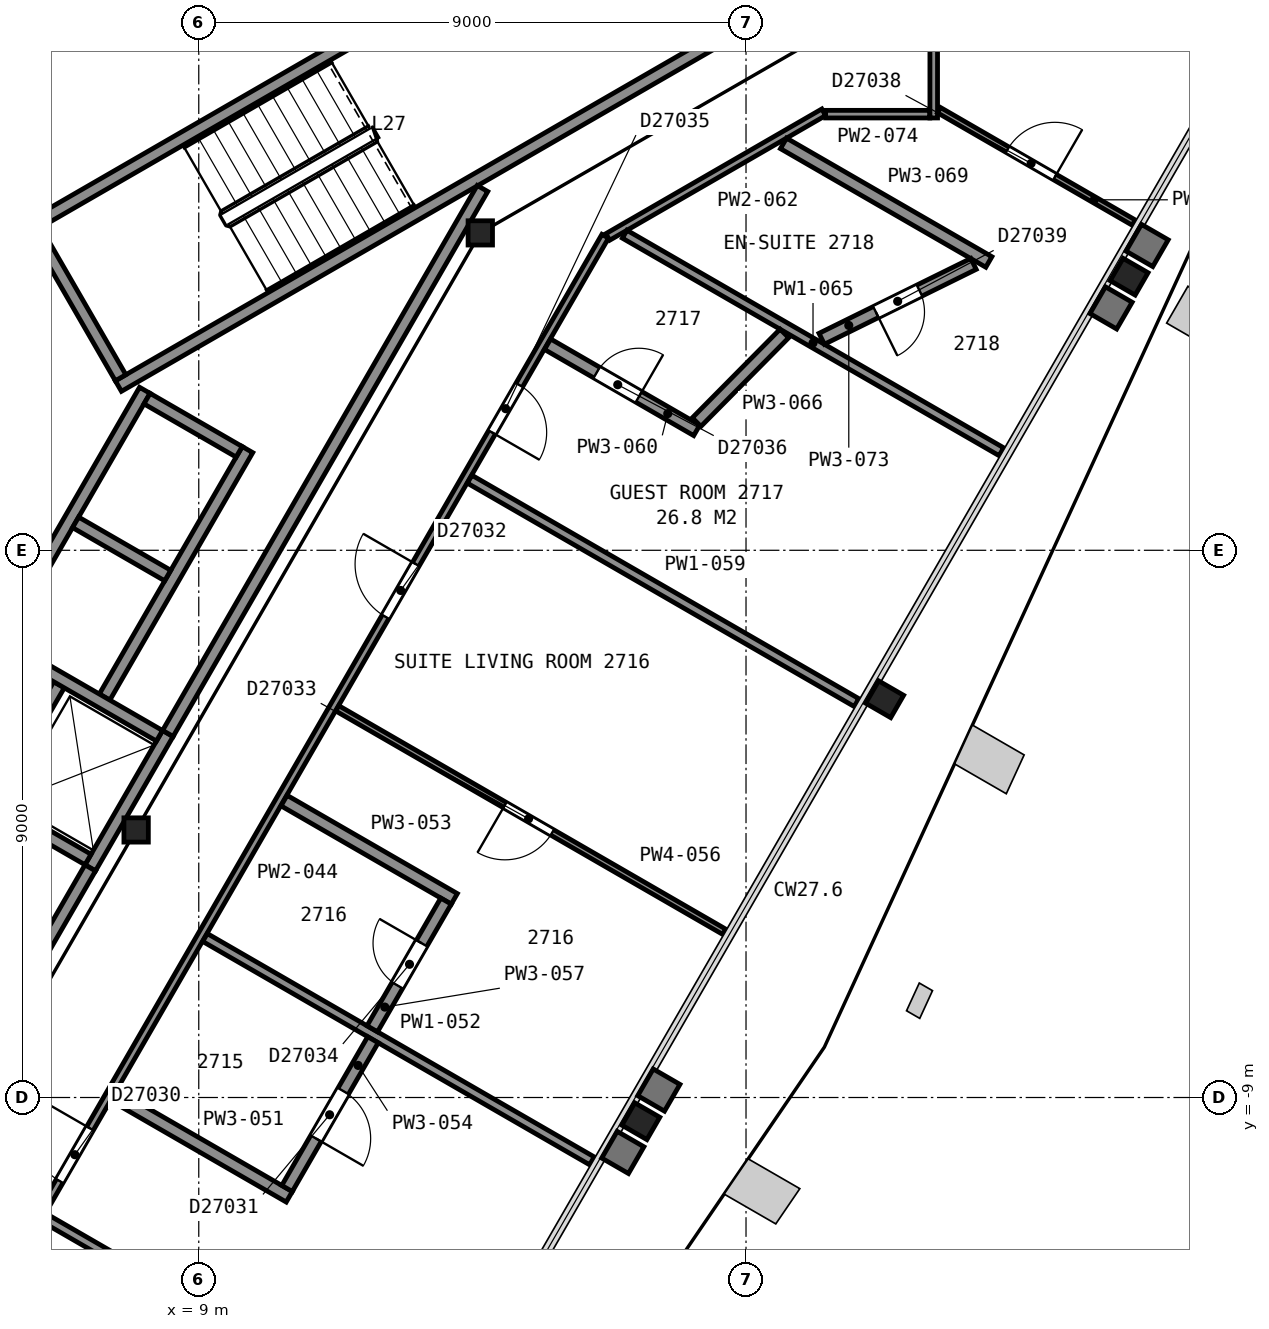
"""IFC4 building model, lengths in metres.
Left out: names, types, materials, properties, quantities, classifications, styles, units other than length and angle.
Written with IfcOpenShell. Run it as: python <this file> out.ifc"""

import sys

from ifc_helpers import new_model, si_unit, direction, frame, frame_2d, origin, origin_2d, place, context, subcontext, project, spatial, rectangle, i_section, extrude, element, fill, save


model = new_model("IFC4")
c1 = context("Model", 3, precision=1e-05, world=origin(), true_north=direction((0.0, 1.0)))
c2 = subcontext(c1, "Body", "Model", "MODEL_VIEW")
j1 = project(units=[si_unit("LENGTHUNIT", "METRE"), si_unit("PLANEANGLEUNIT", "RADIAN")], contexts=[c1])
p1 = place(None, origin())
s1 = spatial("IfcSite", under=j1, at=p1, CompositionType="ELEMENT")
p2 = place(p1, origin())
s2 = spatial("IfcBuilding", under=s1, at=p2, CompositionType="ELEMENT")
p3 = place(p2, frame((0.0, 0.0, 114.4)))
s3 = spatial("IfcBuildingStorey", under=s2, at=p3, CompositionType="ELEMENT", Elevation=114.4)
p4 = place(p3, frame((16.27, -9.39, 0.0), z_axis=(0.0, 0.0, 1.0), x_axis=(-0.5, -0.866025403784, 0.0)))
e1 = element("IfcColumn", 1, at=p4, inside=s3, PredefinedType="COLUMN", context=c2, shape_type="SweptSolid", body=[
    extrude(i_section(OverallWidth=0.424, OverallDepth=0.475, WebThickness=0.048, FlangeThickness=0.077, FilletRadius=0.015, at=origin_2d()), origin(), (0.0, 0.0, 1.0), 3.565),
])
p5 = place(p3, frame((20.28, -2.45, 0.0), z_axis=(0.0, 0.0, 1.0), x_axis=(-0.5, -0.866025403784, 0.0)))
e2 = element("IfcColumn", 2, at=p5, inside=s3, PredefinedType="COLUMN", context=c2, shape_type="SweptSolid", body=[
    extrude(i_section(OverallWidth=0.424, OverallDepth=0.475, WebThickness=0.048, FlangeThickness=0.077, FilletRadius=0.015, at=origin_2d()), origin(), (0.0, 0.0, 1.0), 3.56),
])
p6 = place(p3, frame((24.3, 4.5, 0.0), z_axis=(0.0, 0.0, 1.0), x_axis=(-0.5, -0.866025403784, 0.0)))
e3 = element("IfcColumn", 3, at=p6, inside=s3, PredefinedType="COLUMN", context=c2, shape_type="SweptSolid", body=[
    extrude(i_section(OverallWidth=0.424, OverallDepth=0.475, WebThickness=0.048, FlangeThickness=0.077, FilletRadius=0.015, at=origin_2d()), origin(), (0.0, 0.0, 1.0), 3.555),
])
for number, where, z_axis, x_axis in (
    (4, (13.63, 5.22, 0.0), (0.0, 0.0, 1.0), (1.0, 0.0, 0.0)),
    (5, (7.97, -4.6, 0.0), (0.0, 0.0, 1.0), (1.0, 0.0, 0.0)),
):
    element("IfcColumn", number, at=place(p3, frame(where, z_axis=z_axis, x_axis=x_axis)), inside=s3, PredefinedType="COLUMN", context=c2, shape_type="SweptSolid", body=[
        extrude(i_section(OverallWidth=0.401, OverallDepth=0.399, WebThickness=0.025, FlangeThickness=0.04, FilletRadius=0.015, at=origin_2d()), origin(), (0.0, 0.0, 1.0), 3.6),
    ])
for number, where, z_axis, x_axis in (
    (6, (6.178, 5.299, 0.0), (0.0, 0.0, 1.0), (0.866, 0.5, 0.0)),
    (7, (7.678, 2.701, 0.0), (0.0, 0.0, 1.0), (0.866, 0.5, 0.0)),
):
    element("IfcWall", number, at=place(p3, frame(where, z_axis=z_axis, x_axis=x_axis)), inside=s3, PredefinedType="PARTITIONING", context=c2, shape_type="SweptSolid", body=[
        extrude(rectangle(XDim=12.0, YDim=0.2, at=frame_2d((6.0, 0.0))), origin(), (0.0, 0.0, 1.0), 3.35),
    ])
p7 = place(p3, frame((7.715, 2.838, 0.0), z_axis=(0.0, 0.0, 1.0), x_axis=(-0.500049511043, 0.865996816683, 0.0)))
e8 = element("IfcWall", 8, at=p7, inside=s3, PredefinedType="PARTITIONING", context=c2, shape_type="SweptSolid", body=[
    extrude(rectangle(XDim=2.8, YDim=0.2, at=frame_2d((1.4, 0.0))), origin(), (0.0, 0.0, 1.0), 3.35),
])
p8 = place(p3, frame((7.216, -5.222, 0.0), z_axis=(0.0, 0.0, 1.0), x_axis=(0.499990435942, 0.866030925526, 0.0)))
e9 = element("IfcWall", 9, at=p8, inside=s3, PredefinedType="PARTITIONING", context=c2, shape_type="SweptSolid", body=[
    extrude(rectangle(XDim=2.55, YDim=0.2, at=frame_2d((1.275, 0.0))), origin(), (0.0, 0.0, 1.0), 3.6),
])
p9 = place(p3, frame((7.451, -2.414, 0.0), z_axis=(0.0, 0.0, 1.0), x_axis=(0.500016218704, 0.866016039709, 0.0)))
e10 = element("IfcWall", 10, at=p9, inside=s3, PredefinedType="PARTITIONING", context=c2, shape_type="SweptSolid", body=[
    extrude(rectangle(XDim=4.7, YDim=0.2, at=frame_2d((2.35, 0.0))), origin(), (0.0, 0.0, 1.0), 3.6),
])
p10 = place(p3, frame((5.527, -4.247, 0.0), z_axis=(0.0, 0.0, 1.0), x_axis=(0.499938297808, 0.866061024631, 0.0)))
e11 = element("IfcWall", 11, at=p10, inside=s3, PredefinedType="PARTITIONING", context=c2, shape_type="SweptSolid", body=[
    extrude(rectangle(XDim=2.35, YDim=0.2, at=frame_2d((1.175, 0.0))), origin(), (0.0, 0.0, 1.0), 3.6),
])
p11 = place(p10, frame((0.725, 0.0, 0.0)))
e12 = element("IfcOpeningElement", 12, at=p11, cuts=e11, PredefinedType="OPENING", context=c2, shape_type="SweptSolid", body=[
    extrude(rectangle(XDim=1.1, YDim=2.1, at=frame_2d((0.55, 1.05))), frame((0.0, 0.11, 0.0), z_axis=(0.0, -1.0, 0.0), x_axis=(1.0, 0.0, 0.0)), (0.0, 0.0, 1.0), 0.22),
])
p12 = place(p3, frame((5.663, -1.612, 0.0), z_axis=(0.0, 0.0, 1.0), x_axis=(0.49998122708, 0.866036242063, 0.0)))
e13 = element("IfcWall", 13, at=p12, inside=s3, PredefinedType="PARTITIONING", context=c2, shape_type="SweptSolid", body=[
    extrude(rectangle(XDim=4.9, YDim=0.2, at=frame_2d((2.45, 0.0))), origin(), (0.0, 0.0, 1.0), 3.6),
])
p13 = place(p3, frame((9.665, 1.62, 0.0), z_axis=(0.0, 0.0, 1.0), x_axis=(-0.866002029911, 0.500040482552, 0.0)))
e14 = element("IfcWall", 14, at=p13, inside=s3, PredefinedType="PARTITIONING", context=c2, shape_type="SweptSolid", body=[
    extrude(rectangle(XDim=1.75, YDim=0.2, at=frame_2d((0.875, 0.0))), origin(), (0.0, 0.0, 1.0), 3.6),
])
p14 = place(p3, frame((8.49, -0.416, 0.0), z_axis=(0.0, 0.0, 1.0), x_axis=(-0.866036909293, 0.499980071345, 0.0)))
e15 = element("IfcWall", 15, at=p14, inside=s3, PredefinedType="PARTITIONING", context=c2, shape_type="SweptSolid", body=[
    extrude(rectangle(XDim=1.75, YDim=0.2, at=frame_2d((0.875, 0.0))), origin(), (0.0, 0.0, 1.0), 3.6),
])
p15 = place(p3, frame((8.354, -3.051, 0.0), z_axis=(0.0, 0.0, 1.0), x_axis=(-0.866060182126, 0.499939757307, 0.0)))
e16 = element("IfcWall", 16, at=p15, inside=s3, PredefinedType="PARTITIONING", context=c2, shape_type="SweptSolid", body=[
    extrude(rectangle(XDim=2.95, YDim=0.2, at=frame_2d((1.475, 0.0))), origin(), (0.0, 0.0, 1.0), 3.6),
])
p16 = place(p3, frame((7.179, -5.086, 0.0), z_axis=(0.0, 0.0, 1.0), x_axis=(-0.866036909293, 0.499980071345, 0.0)))
e17 = element("IfcWall", 17, at=p16, inside=s3, PredefinedType="PARTITIONING", context=c2, shape_type="SweptSolid", body=[
    extrude(rectangle(XDim=1.75, YDim=0.2, at=frame_2d((0.875, 0.0))), origin(), (0.0, 0.0, 1.0), 3.6),
])
p17 = place(p3, frame((5.906, -7.49, 0.0), z_axis=(0.0, 0.0, 1.0), x_axis=(0.500252727967, 0.865879442048, 0.0)))
e18 = element("IfcWall", 18, at=p17, inside=s3, PredefinedType="PARTITIONING", context=c2, shape_type="SweptSolid", body=[
    extrude(rectangle(XDim=2.617, YDim=0.2, at=frame_2d((1.309, 0.0))), origin(), (0.0, 0.0, 1.0), 3.35),
])
p18 = place(p3, frame((8.492, -3.012, 0.0), z_axis=(0.0, 0.0, 1.0), x_axis=(0.499972957231, 0.866041016371, 0.0)))
e19 = element("IfcWall", 19, at=p18, inside=s3, PredefinedType="PARTITIONING", context=c2, shape_type="SweptSolid", body=[
    extrude(rectangle(XDim=10.349, YDim=0.2, at=frame_2d((5.174, 0.0))), origin(), (0.0, 0.0, 1.0), 3.35),
])
p19 = place(p3, frame((15.684, 5.165, 0.0), z_axis=(0.0, 0.0, 1.0), x_axis=(-0.500027787016, -0.866009360349, 0.0)))
e20 = element("IfcWall", 20, at=p19, inside=s3, PredefinedType="PARTITIONING", context=c2, shape_type="SweptSolid", body=[
    extrude(rectangle(XDim=23.856, YDim=0.125, at=frame_2d((11.928, 0.0))), origin(), (0.0, 0.0, 1.0), 2.613),
])
p20 = place(p19, frame((20.245, 0.0, 0.0)))
e21 = element("IfcOpeningElement", 21, at=p20, cuts=e20, PredefinedType="OPENING", context=c2, shape_type="SweptSolid", body=[
    extrude(rectangle(XDim=1.0, YDim=2.1, at=frame_2d((0.5, 1.05))), frame((0.0, 0.073, 0.0), z_axis=(0.0, -1.0, 0.0), x_axis=(1.0, 0.0, 0.0)), (0.0, 0.0, 1.0), 0.145),
])
p21 = place(p19, frame((16.943, 0.0, 0.0)))
e22 = element("IfcOpeningElement", 22, at=p21, cuts=e20, PredefinedType="OPENING", context=c2, shape_type="SweptSolid", body=[
    extrude(rectangle(XDim=1.0, YDim=2.1, at=frame_2d((0.5, 1.05))), frame((0.0, 0.073, 0.0), z_axis=(0.0, -1.0, 0.0), x_axis=(1.0, 0.0, 0.0)), (0.0, 0.0, 1.0), 0.145),
])
p22 = place(p19, frame((6.227, 0.0, 0.0)))
e23 = element("IfcOpeningElement", 23, at=p22, cuts=e20, PredefinedType="OPENING", context=c2, shape_type="SweptSolid", body=[
    extrude(rectangle(XDim=1.0, YDim=2.1, at=frame_2d((0.5, 1.05))), frame((0.0, 0.073, 0.0), z_axis=(0.0, -1.0, 0.0), x_axis=(1.0, 0.0, 0.0)), (0.0, 0.0, 1.0), 0.145),
])
p23 = place(p19, frame((2.825, 0.0, 0.0)))
e24 = element("IfcOpeningElement", 24, at=p23, cuts=e20, PredefinedType="OPENING", context=c2, shape_type="SweptSolid", body=[
    extrude(rectangle(XDim=0.9, YDim=2.1, at=frame_2d((0.45, 1.05))), frame((0.0, 0.073, 0.0), z_axis=(0.0, -1.0, 0.0), x_axis=(1.0, 0.0, 0.0)), (0.0, 0.0, 1.0), 0.145),
])
p24 = place(p3, frame((6.441, -10.968, 0.0), z_axis=(0.0, 0.0, 1.0), x_axis=(0.8660606245, -0.499938990969, 0.0)))
e25 = element("IfcWall", 25, at=p24, inside=s3, PredefinedType="PARTITIONING", context=c2, shape_type="SweptSolid", body=[
    extrude(rectangle(XDim=7.353, YDim=0.15, at=frame_2d((3.676, 0.0))), origin(), (0.0, 0.0, 1.0), 2.613),
])
p25 = place(p3, frame((7.603, -8.967, 0.0), z_axis=(0.0, 0.0, 1.0), x_axis=(0.866020884234, -0.500007828009, 0.0)))
e26 = element("IfcWall", 26, at=p25, inside=s3, PredefinedType="PARTITIONING", context=c2, shape_type="SweptSolid", body=[
    extrude(rectangle(XDim=3.333, YDim=0.2, at=frame_2d((1.666, 0.0))), origin(), (0.0, 0.0, 1.0), 2.613),
])
p26 = place(p3, frame((9.103, -6.369, 0.0), z_axis=(0.0, 0.0, 1.0), x_axis=(0.866055004685, -0.499948726231, 0.0)))
e27 = element("IfcWall", 27, at=p26, inside=s3, PredefinedType="PARTITIONING", context=c2, shape_type="SweptSolid", body=[
    extrude(rectangle(XDim=7.347, YDim=0.15, at=frame_2d((3.674, 0.0))), origin(), (0.0, 0.0, 1.0), 2.613),
])
p27 = place(p3, frame((10.403, -4.117, 0.0), z_axis=(0.0, 0.0, 1.0), x_axis=(0.866078705744, -0.499907666931, 0.0)))
e28 = element("IfcWall", 28, at=p27, inside=s3, PredefinedType="PARTITIONING", context=c2, shape_type="SweptSolid", body=[
    extrude(rectangle(XDim=3.233, YDim=0.2, at=frame_2d((1.616, 0.0))), origin(), (0.0, 0.0, 1.0), 2.613),
])
p28 = place(p3, frame((10.452, -10.496, 0.0), z_axis=(0.0, 0.0, 1.0), x_axis=(0.500061596976, 0.865989837833, 0.0)))
e29 = element("IfcWall", 29, at=p28, inside=s3, PredefinedType="PARTITIONING", context=c2, shape_type="SweptSolid", body=[
    extrude(rectangle(XDim=2.825, YDim=0.2, at=frame_2d((1.413, 0.0))), origin(), (0.0, 0.0, 1.0), 2.613),
])
p29 = place(p28, frame((0.95, 0.0, 0.0)))
e30 = element("IfcOpeningElement", 30, at=p29, cuts=e29, PredefinedType="OPENING", context=c2, shape_type="SweptSolid", body=[
    extrude(rectangle(XDim=0.9, YDim=2.1, at=frame_2d((0.45, 1.05))), frame((0.0, 0.11, 0.0), z_axis=(0.0, -1.0, 0.0), x_axis=(1.0, 0.0, 0.0)), (0.0, 0.0, 1.0), 0.22),
])
p30 = place(p3, frame((17.642, -6.274, 0.0), z_axis=(0.0, 0.0, 1.0), x_axis=(-0.866003534372, 0.50003787702, 0.0)))
e31 = element("IfcWall", 31, at=p30, inside=s3, PredefinedType="PARTITIONING", context=c2, shape_type="SweptSolid", body=[
    extrude(rectangle(XDim=7.348, YDim=0.1, at=frame_2d((3.674, 0.0))), origin(), (0.0, 0.0, 1.0), 2.613),
])
p31 = place(p30, frame((3.265, 0.0, 0.0)))
e32 = element("IfcOpeningElement", 32, at=p31, cuts=e31, PredefinedType="OPENING", context=c2, shape_type="SweptSolid", body=[
    extrude(rectangle(XDim=0.9, YDim=2.1, at=frame_2d((0.45, 1.05))), frame((0.0, 0.06, 0.0), z_axis=(0.0, -1.0, 0.0), x_axis=(1.0, 0.0, 0.0)), (0.0, 0.0, 1.0), 0.12),
])
p32 = place(p3, frame((11.854, -7.87, 0.0), z_axis=(0.0, 0.0, 1.0), x_axis=(0.499885111907, 0.866091724296, 0.0)))
e33 = element("IfcWall", 33, at=p32, inside=s3, PredefinedType="PARTITIONING", context=c2, shape_type="SweptSolid", body=[
    extrude(rectangle(XDim=2.425, YDim=0.2, at=frame_2d((1.213, 0.0))), origin(), (0.0, 0.0, 1.0), 2.613),
])
p33 = place(p32, frame((0.825, 0.0, 0.0)))
e34 = element("IfcOpeningElement", 34, at=p33, cuts=e33, PredefinedType="OPENING", context=c2, shape_type="SweptSolid", body=[
    extrude(rectangle(XDim=0.8, YDim=2.1, at=frame_2d((0.4, 1.05))), frame((0.0, 0.11, 0.0), z_axis=(0.0, -1.0, 0.0), x_axis=(1.0, 0.0, 0.0)), (0.0, 0.0, 1.0), 0.22),
])
p34 = place(p3, frame((13.454, 1.169, 0.0), z_axis=(0.0, 0.0, 1.0), x_axis=(0.866011842101, -0.500023488788, 0.0)))
e35 = element("IfcWall", 35, at=p34, inside=s3, PredefinedType="PARTITIONING", context=c2, shape_type="SweptSolid", body=[
    extrude(rectangle(XDim=7.348, YDim=0.15, at=frame_2d((3.674, 0.0))), origin(), (0.0, 0.0, 1.0), 2.613),
])
p35 = place(p3, frame((14.737, 3.389, 0.0), z_axis=(0.0, 0.0, 1.0), x_axis=(0.866033446572, -0.499986069224, 0.0)))
e36 = element("IfcWall", 36, at=p35, inside=s3, PredefinedType="PARTITIONING", context=c2, shape_type="SweptSolid", body=[
    extrude(rectangle(XDim=2.833, YDim=0.2, at=frame_2d((1.416, 0.0))), origin(), (0.0, 0.0, 1.0), 2.613),
])
p36 = place(p35, frame((0.932, 0.0, 0.0)))
e37 = element("IfcOpeningElement", 37, at=p36, cuts=e36, PredefinedType="OPENING", context=c2, shape_type="SweptSolid", body=[
    extrude(rectangle(XDim=0.8, YDim=2.1, at=frame_2d((0.4, 1.05))), frame((0.0, 0.11, 0.0), z_axis=(0.0, -1.0, 0.0), x_axis=(1.0, 0.0, 0.0)), (0.0, 0.0, 1.0), 0.22),
])
p37 = place(p3, frame((15.727, 5.154, 0.0), z_axis=(0.0, 0.0, 1.0), x_axis=(0.865992261418, 0.50005739987, 0.0)))
e38 = element("IfcWall", 38, at=p37, inside=s3, PredefinedType="PARTITIONING", context=c2, shape_type="SweptSolid", body=[
    extrude(rectangle(XDim=4.101, YDim=0.125, at=frame_2d((2.051, 0.0))), origin(), (0.0, 0.0, 1.0), 2.613),
])
p38 = place(p3, frame((16.004, 5.198, 0.0), z_axis=(0.0, 0.0, 1.0), x_axis=(0.866025331845, -0.500000124603, 0.0)))
e39 = element("IfcWall", 39, at=p38, inside=s3, PredefinedType="PARTITIONING", context=c2, shape_type="SweptSolid", body=[
    extrude(rectangle(XDim=7.154, YDim=0.15, at=frame_2d((3.577, 0.0))), origin(), (0.0, 0.0, 1.0), 2.613),
])
p39 = place(p3, frame((17.188, 2.108, 0.0), z_axis=(0.0, 0.0, 1.0), x_axis=(0.703527770295, 0.710667767964, 0.0)))
e40 = element("IfcWall", 40, at=p39, inside=s3, PredefinedType="PARTITIONING", context=c2, shape_type="SweptSolid", body=[
    extrude(rectangle(XDim=2.052, YDim=0.2, at=frame_2d((1.026, 0.0))), origin(), (0.0, 0.0, 1.0), 2.613),
])
p40 = place(p3, frame((18.616, 6.692, 0.0), z_axis=(0.0, 0.0, 1.0), x_axis=(0.865984367075, -0.500071070931, 0.0)))
e41 = element("IfcWall", 41, at=p40, inside=s3, PredefinedType="PARTITIONING", context=c2, shape_type="SweptSolid", body=[
    extrude(rectangle(XDim=3.9, YDim=0.2, at=frame_2d((1.95, 0.0))), origin(), (0.0, 0.0, 1.0), 2.613),
])
p41 = place(p3, frame((19.245, 3.479, 0.0), z_axis=(0.0, 0.0, 1.0), x_axis=(0.896782684503, 0.44247126096, 0.0)))
e42 = element("IfcWall", 42, at=p41, inside=s3, PredefinedType="PARTITIONING", context=c2, shape_type="SweptSolid", body=[
    extrude(rectangle(XDim=2.784, YDim=0.2, at=frame_2d((1.392, 0.0))), origin(), (0.0, 0.0, 1.0), 2.613),
])
p42 = place(p41, frame((0.993, 0.0, 0.0)))
e43 = element("IfcOpeningElement", 43, at=p42, cuts=e42, PredefinedType="OPENING", context=c2, shape_type="SweptSolid", body=[
    extrude(rectangle(XDim=0.8, YDim=2.1, at=frame_2d((0.4, 1.05))), frame((0.0, 0.11, 0.0), z_axis=(0.0, -1.0, 0.0), x_axis=(1.0, 0.0, 0.0)), (0.0, 0.0, 1.0), 0.22),
])
p43 = place(p3, frame((19.309, 7.173, 0.0), z_axis=(0.0, 0.0, 1.0), x_axis=(1.0, 0.0, 0.0)))
e44 = element("IfcWall", 44, at=p43, inside=s3, PredefinedType="PARTITIONING", context=c2, shape_type="SweptSolid", body=[
    extrude(rectangle(XDim=1.713, YDim=0.125, at=frame_2d((0.856, 0.0))), origin(), (0.0, 0.0, 1.0), 2.613),
])
p44 = place(p3, frame((21.087, 7.111, 0.0), z_axis=(0.0, 0.0, 1.0), x_axis=(0.0, 1.0, 0.0)))
e45 = element("IfcWall", 45, at=p44, inside=s3, PredefinedType="PARTITIONING", context=c2, shape_type="SweptSolid", body=[
    extrude(rectangle(XDim=3.099, YDim=0.125, at=frame_2d((1.549, 0.0))), origin(), (0.0, 0.0, 1.0), 2.613),
])
p45 = place(p3, frame((24.376, 5.39, 0.0), z_axis=(0.0, 0.0, 1.0), x_axis=(-0.865974401185, 0.500088328689, 0.0)))
e46 = element("IfcWall", 46, at=p45, inside=s3, PredefinedType="PARTITIONING", context=c2, shape_type="SweptSolid", body=[
    extrude(rectangle(XDim=3.697, YDim=0.1, at=frame_2d((1.848, 0.0))), origin(), (0.0, 0.0, 1.0), 2.613),
])
p46 = place(p45, frame((1.498, 0.0, 0.0)))
e47 = element("IfcOpeningElement", 47, at=p46, cuts=e46, PredefinedType="OPENING", context=c2, shape_type="SweptSolid", body=[
    extrude(rectangle(XDim=0.9, YDim=2.1, at=frame_2d((0.45, 1.05))), frame((0.0, 0.06, 0.0), z_axis=(0.0, -1.0, 0.0), x_axis=(1.0, 0.0, 0.0)), (0.0, 0.0, 1.0), 0.12),
])
p47 = place(p21, origin())
e48 = element("IfcDoor", 48, at=p47, inside=s3, OperationType="SINGLE_SWING_LEFT", PredefinedType="DOOR", context=c2, shape_type="SweptSolid", body=[
    extrude(rectangle(XDim=1.0, YDim=2.1, at=frame_2d((0.5, 1.05))), frame((0.0, 0.025, 0.0), z_axis=(0.0, -1.0, 0.0), x_axis=(1.0, 0.0, 0.0)), (0.0, 0.0, 1.0), 0.05),
])
fill(e22, e48)
p48 = place(p22, origin())
e49 = element("IfcDoor", 49, at=p48, inside=s3, OperationType="SINGLE_SWING_LEFT", PredefinedType="DOOR", context=c2, shape_type="SweptSolid", body=[
    extrude(rectangle(XDim=1.0, YDim=2.1, at=frame_2d((0.5, 1.05))), frame((0.0, 0.025, 0.0), z_axis=(0.0, -1.0, 0.0), x_axis=(1.0, 0.0, 0.0)), (0.0, 0.0, 1.0), 0.05),
])
fill(e23, e49)
p49 = place(p23, origin())
e50 = element("IfcDoor", 50, at=p49, inside=s3, OperationType="SINGLE_SWING_RIGHT", PredefinedType="DOOR", context=c2, shape_type="SweptSolid", body=[
    extrude(rectangle(XDim=0.9, YDim=2.1, at=frame_2d((0.45, 1.05))), frame((0.0, 0.025, 0.0), z_axis=(0.0, -1.0, 0.0), x_axis=(1.0, 0.0, 0.0)), (0.0, 0.0, 1.0), 0.05),
])
fill(e24, e50)
p50 = place(p29, origin())
e51 = element("IfcDoor", 51, at=p50, inside=s3, OperationType="SINGLE_SWING_LEFT", PredefinedType="DOOR", context=c2, shape_type="SweptSolid", body=[
    extrude(rectangle(XDim=0.9, YDim=2.1, at=frame_2d((0.45, 1.05))), frame((0.0, 0.025, 0.0), z_axis=(0.0, -1.0, 0.0), x_axis=(1.0, 0.0, 0.0)), (0.0, 0.0, 1.0), 0.05),
])
fill(e30, e51)
p51 = place(p31, origin())
e52 = element("IfcDoor", 52, at=p51, inside=s3, OperationType="SINGLE_SWING_RIGHT", PredefinedType="DOOR", context=c2, shape_type="SweptSolid", body=[
    extrude(rectangle(XDim=0.9, YDim=2.1, at=frame_2d((0.45, 1.05))), frame((0.0, 0.025, 0.0), z_axis=(0.0, -1.0, 0.0), x_axis=(1.0, 0.0, 0.0)), (0.0, 0.0, 1.0), 0.05),
])
fill(e32, e52)
p52 = place(p33, origin())
e53 = element("IfcDoor", 53, at=p52, inside=s3, OperationType="SINGLE_SWING_RIGHT", PredefinedType="DOOR", context=c2, shape_type="SweptSolid", body=[
    extrude(rectangle(XDim=0.8, YDim=2.1, at=frame_2d((0.4, 1.05))), frame((0.0, 0.025, 0.0), z_axis=(0.0, -1.0, 0.0), x_axis=(1.0, 0.0, 0.0)), (0.0, 0.0, 1.0), 0.05),
])
fill(e34, e53)
p53 = place(p36, origin())
e54 = element("IfcDoor", 54, at=p53, inside=s3, OperationType="SINGLE_SWING_RIGHT", PredefinedType="DOOR", context=c2, shape_type="SweptSolid", body=[
    extrude(rectangle(XDim=0.8, YDim=2.1, at=frame_2d((0.4, 1.05))), frame((0.0, 0.025, 0.0), z_axis=(0.0, -1.0, 0.0), x_axis=(1.0, 0.0, 0.0)), (0.0, 0.0, 1.0), 0.05),
])
fill(e37, e54)
p54 = place(p42, origin())
e55 = element("IfcDoor", 55, at=p54, inside=s3, OperationType="SINGLE_SWING_LEFT", PredefinedType="DOOR", context=c2, shape_type="SweptSolid", body=[
    extrude(rectangle(XDim=0.8, YDim=2.1, at=frame_2d((0.4, 1.05))), frame((0.0, 0.025, 0.0), z_axis=(0.0, -1.0, 0.0), x_axis=(1.0, 0.0, 0.0)), (0.0, 0.0, 1.0), 0.05),
])
fill(e43, e55)
p55 = place(p46, origin())
e56 = element("IfcDoor", 56, at=p55, inside=s3, OperationType="SINGLE_SWING_LEFT", PredefinedType="DOOR", context=c2, shape_type="SweptSolid", body=[
    extrude(rectangle(XDim=0.9, YDim=2.1, at=frame_2d((0.45, 1.05))), frame((0.0, 0.025, 0.0), z_axis=(0.0, -1.0, 0.0), x_axis=(1.0, 0.0, 0.0)), (0.0, 0.0, 1.0), 0.05),
])
fill(e47, e56)
save(model, sys.argv[1])
